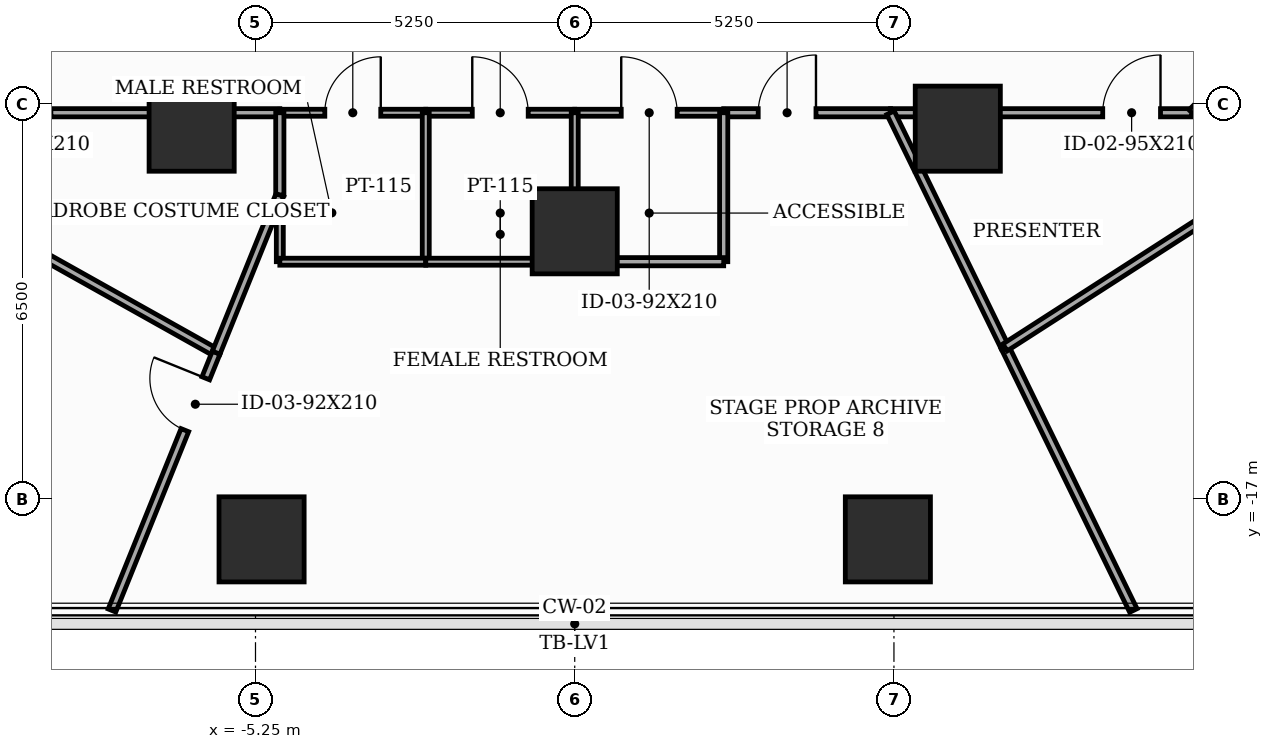
"""IFC4 building model, lengths in metres.
Left out: names, types, materials, properties, quantities, classifications, styles, units other than length and angle.
Written with IfcOpenShell. Run it as: python <this file> out.ifc"""

import sys

from ifc_helpers import new_model, si_unit, direction, frame, frame_2d, origin, origin_2d, place, context, subcontext, project, spatial, rectangle, extrude, element, fill, save


model = new_model("IFC4")
c1 = context("Model", 3, precision=1e-05, world=origin(), true_north=direction((0.0, 1.0)))
c2 = subcontext(c1, "Body", "Model", "MODEL_VIEW")
j1 = project(units=[si_unit("LENGTHUNIT", "METRE"), si_unit("PLANEANGLEUNIT", "RADIAN")], contexts=[c1])
p1 = place(None, origin())
s1 = spatial("IfcSite", under=j1, at=p1, CompositionType="ELEMENT")
p2 = place(p1, origin())
s2 = spatial("IfcBuilding", under=s1, at=p2, CompositionType="ELEMENT")
p3 = place(p2, frame((0.0, 0.0, 40.8)))
s3 = spatial("IfcBuildingStorey", under=s2, at=p3, CompositionType="ELEMENT", Elevation=40.8)
for number, where, z_axis, x_axis in (
    (1, (-6.3, -10.912, 0.0), (0.0, 0.0, 1.0), (1.0, 0.0, 0.0)),
    (2, (0.0, -12.6, 0.0), (0.0, 0.0, 1.0), (1.0, 0.0, 0.0)),
    (3, (6.3, -10.912, 0.0), (0.0, 0.0, 1.0), (1.0, 0.0, 0.0)),
    (4, (-5.15, -17.667, 0.0), (0.0, 0.0, 1.0), (1.0, 0.0, 0.0)),
    (5, (5.15, -17.667, 0.0), (0.0, 0.0, 1.0), (1.0, 0.0, 0.0)),
):
    element("IfcColumn", number, at=place(p3, frame(where, z_axis=z_axis, x_axis=x_axis)), inside=s3, PredefinedType="COLUMN", context=c2, shape_type="SweptSolid", body=[
        extrude(rectangle(XDim=1.4, YDim=1.4, at=origin_2d()), origin(), (0.0, 0.0, 1.0), 3.7),
    ])
p4 = place(p3, frame((-10.15, -10.65, 0.0), z_axis=(0.0, 0.0, 1.0), x_axis=(1.0, 0.0, 0.0)))
e6 = element("IfcWall", 6, at=p4, inside=s3, PredefinedType="PARTITIONING", context=c2, shape_type="SweptSolid", body=[
    extrude(rectangle(XDim=5.3, YDim=0.135, at=frame_2d((2.65, 0.0))), origin(), (0.0, 0.0, 1.0), 2.785),
])
p5 = place(p4, frame((0.585, 0.0, 0.0)))
e7 = element("IfcOpeningElement", 7, at=p5, cuts=e6, PredefinedType="OPENING", context=c2, shape_type="SweptSolid", body=[
    extrude(rectangle(XDim=0.95, YDim=2.1, at=frame_2d((0.475, 1.05))), frame((0.0, 0.077, 0.0), z_axis=(0.0, -1.0, 0.0), x_axis=(1.0, 0.0, 0.0)), (0.0, 0.0, 1.0), 0.155),
])
p6 = place(p3, frame((-4.85, -10.65, 0.0), z_axis=(0.0, 0.0, 1.0), x_axis=(1.0, 0.0, 0.0)))
e8 = element("IfcWall", 8, at=p6, inside=s3, PredefinedType="PARTITIONING", context=c2, shape_type="SweptSolid", body=[
    extrude(rectangle(XDim=2.4, YDim=0.115, at=frame_2d((1.2, 0.0))), origin(), (0.0, 0.0, 1.0), 3.5),
])
p7 = place(p6, frame((0.74, 0.0, 0.0)))
e9 = element("IfcOpeningElement", 9, at=p7, cuts=e8, PredefinedType="OPENING", context=c2, shape_type="SweptSolid", body=[
    extrude(rectangle(XDim=0.92, YDim=2.1, at=frame_2d((0.46, 1.05))), frame((0.0, 0.067, 0.0), z_axis=(0.0, -1.0, 0.0), x_axis=(1.0, 0.0, 0.0)), (0.0, 0.0, 1.0), 0.135),
])
p8 = place(p3, frame((-2.45, -10.65, 0.0), z_axis=(0.0, 0.0, 1.0), x_axis=(1.0, 0.0, 0.0)))
e10 = element("IfcWall", 10, at=p8, inside=s3, PredefinedType="PARTITIONING", context=c2, shape_type="SweptSolid", body=[
    extrude(rectangle(XDim=2.45, YDim=0.115, at=frame_2d((1.225, 0.0))), origin(), (0.0, 0.0, 1.0), 2.785),
])
p9 = place(p8, frame((0.765, 0.0, 0.0)))
e11 = element("IfcOpeningElement", 11, at=p9, cuts=e10, PredefinedType="OPENING", context=c2, shape_type="SweptSolid", body=[
    extrude(rectangle(XDim=0.92, YDim=2.1, at=frame_2d((0.46, 1.05))), frame((0.0, 0.067, 0.0), z_axis=(0.0, -1.0, 0.0), x_axis=(1.0, 0.0, 0.0)), (0.0, 0.0, 1.0), 0.135),
])
p10 = place(p3, frame((2.45, -10.65, 0.0), z_axis=(0.0, 0.0, 1.0), x_axis=(1.0, 0.0, 0.0)))
e12 = element("IfcWall", 12, at=p10, inside=s3, PredefinedType="PARTITIONING", context=c2, shape_type="SweptSolid", body=[
    extrude(rectangle(XDim=2.744, YDim=0.135, at=frame_2d((1.372, 0.0))), origin(), (0.0, 0.0, 1.0), 3.5),
])
p11 = place(p10, frame((0.568, 0.0, 0.0)))
e13 = element("IfcOpeningElement", 13, at=p11, cuts=e12, PredefinedType="OPENING", context=c2, shape_type="SweptSolid", body=[
    extrude(rectangle(XDim=0.95, YDim=2.1, at=frame_2d((0.475, 1.05))), frame((0.0, 0.077, 0.0), z_axis=(0.0, -1.0, 0.0), x_axis=(1.0, 0.0, 0.0)), (0.0, 0.0, 1.0), 0.155),
])
p12 = place(p3, frame((0.0, -10.65, 0.0), z_axis=(0.0, 0.0, 1.0), x_axis=(1.0, 0.0, 0.0)))
e14 = element("IfcWall", 14, at=p12, inside=s3, PredefinedType="PARTITIONING", context=c2, shape_type="SweptSolid", body=[
    extrude(rectangle(XDim=2.45, YDim=0.115, at=frame_2d((1.225, 0.0))), origin(), (0.0, 0.0, 1.0), 3.5),
])
p13 = place(p12, frame((0.765, 0.0, 0.0)))
e15 = element("IfcOpeningElement", 15, at=p13, cuts=e14, PredefinedType="OPENING", context=c2, shape_type="SweptSolid", body=[
    extrude(rectangle(XDim=0.92, YDim=2.1, at=frame_2d((0.46, 1.05))), frame((0.0, 0.067, 0.0), z_axis=(0.0, -1.0, 0.0), x_axis=(1.0, 0.0, 0.0)), (0.0, 0.0, 1.0), 0.135),
])
p14 = place(p3, frame((5.194, -10.65, 0.0), z_axis=(0.0, 0.0, 1.0), x_axis=(1.0, 0.0, 0.0)))
e16 = element("IfcWall", 16, at=p14, inside=s3, PredefinedType="PARTITIONING", context=c2, shape_type="SweptSolid", body=[
    extrude(rectangle(XDim=4.956, YDim=0.135, at=frame_2d((2.478, 0.0))), origin(), (0.0, 0.0, 1.0), 2.785),
])
p15 = place(p14, frame((3.49, 0.0, 0.0)))
e17 = element("IfcOpeningElement", 17, at=p15, cuts=e16, PredefinedType="OPENING", context=c2, shape_type="SweptSolid", body=[
    extrude(rectangle(XDim=0.95, YDim=2.1, at=frame_2d((0.475, 1.05))), frame((0.0, 0.077, 0.0), z_axis=(0.0, -1.0, 0.0), x_axis=(1.0, 0.0, 0.0)), (0.0, 0.0, 1.0), 0.155),
])
p16 = place(p3, frame((10.15, -10.65, 0.0), z_axis=(0.0, 0.0, 1.0), x_axis=(0.707106781187, 0.707106781187, 0.0)))
e18 = element("IfcWall", 18, at=p16, inside=s3, PredefinedType="PARTITIONING", context=c2, shape_type="SweptSolid", body=[
    extrude(rectangle(XDim=0.707, YDim=0.135, at=frame_2d((0.354, 0.0))), origin(), (0.0, 0.0, 1.0), 3.5),
])
p17 = place(p3, frame((-5.897, -14.596, 0.0), z_axis=(0.0, 0.0, 1.0), x_axis=(-0.87248894478, 0.488633851915, 0.0)))
e19 = element("IfcWall", 19, at=p17, inside=s3, PredefinedType="PARTITIONING", context=c2, shape_type="SweptSolid", body=[
    extrude(rectangle(XDim=4.39, YDim=0.135, at=frame_2d((2.195, 0.0))), origin(), (0.0, 0.0, 1.0), 2.685),
])
p18 = place(p3, frame((-7.61, -18.837, 0.0), z_axis=(0.0, 0.0, 1.0), x_axis=(0.374545124537, 0.927208687236, 0.0)))
e20 = element("IfcWall", 20, at=p18, inside=s3, PredefinedType="PARTITIONING", context=c2, shape_type="SweptSolid", body=[
    extrude(rectangle(XDim=4.574, YDim=0.135, at=frame_2d((2.287, 0.0))), origin(), (0.0, 0.0, 1.0), 2.685),
])
p19 = place(p18, frame((3.199, 0.0, 0.0)))
e21 = element("IfcOpeningElement", 21, at=p19, cuts=e20, PredefinedType="OPENING", context=c2, shape_type="SweptSolid", body=[
    extrude(rectangle(XDim=0.92, YDim=2.1, at=frame_2d((0.46, 1.05))), frame((0.0, 0.077, 0.0), z_axis=(0.0, -1.0, 0.0), x_axis=(1.0, 0.0, 0.0)), (0.0, 0.0, 1.0), 0.155),
])
p20 = place(p3, frame((-4.85, -12.004, 0.0), z_axis=(0.0, 0.0, 1.0), x_axis=(0.0, 1.0, 0.0)))
e22 = element("IfcWall", 22, at=p20, inside=s3, PredefinedType="PARTITIONING", context=c2, shape_type="SweptSolid", body=[
    extrude(rectangle(XDim=1.354, YDim=0.135, at=frame_2d((0.677, 0.0))), origin(), (0.0, 0.0, 1.0), 2.785),
])
p21 = place(p3, frame((-5.897, -14.596, 0.0), z_axis=(0.0, 0.0, 1.0), x_axis=(0.374490485533, 0.92723075674, 0.0)))
e23 = element("IfcWall", 23, at=p21, inside=s3, PredefinedType="PARTITIONING", context=c2, shape_type="SweptSolid", body=[
    extrude(rectangle(XDim=2.795, YDim=0.135, at=frame_2d((1.398, 0.0))), origin(), (0.0, 0.0, 1.0), 2.685),
])
p22 = place(p3, frame((-2.45, -13.1, 0.0), z_axis=(0.0, 0.0, 1.0), x_axis=(0.0, 1.0, 0.0)))
e24 = element("IfcWall", 24, at=p22, inside=s3, PredefinedType="PARTITIONING", context=c2, shape_type="SweptSolid", body=[
    extrude(rectangle(XDim=2.45, YDim=0.115, at=frame_2d((1.225, 0.0))), origin(), (0.0, 0.0, 1.0), 2.785),
])
p23 = place(p3, frame((-4.85, -12.298, 0.0), z_axis=(0.0, 0.0, 1.0), x_axis=(0.0, -1.0, 0.0)))
e25 = element("IfcWall", 25, at=p23, inside=s3, PredefinedType="PARTITIONING", context=c2, shape_type="SweptSolid", body=[
    extrude(rectangle(XDim=0.802, YDim=0.115, at=frame_2d((0.401, 0.0))), origin(), (0.0, 0.0, 1.0), 3.5),
])
p24 = place(p3, frame((-4.85, -13.1, 0.0), z_axis=(0.0, 0.0, 1.0), x_axis=(1.0, 0.0, 0.0)))
e26 = element("IfcWall", 26, at=p24, inside=s3, PredefinedType="PARTITIONING", context=c2, shape_type="SweptSolid", body=[
    extrude(rectangle(XDim=2.4, YDim=0.115, at=frame_2d((1.2, 0.0))), origin(), (0.0, 0.0, 1.0), 3.5),
])
p25 = place(p3, frame((-2.45, -13.1, 0.0), z_axis=(0.0, 0.0, 1.0), x_axis=(1.0, 0.0, 0.0)))
e27 = element("IfcWall", 27, at=p25, inside=s3, PredefinedType="PARTITIONING", context=c2, shape_type="SweptSolid", body=[
    extrude(rectangle(XDim=2.45, YDim=0.115, at=frame_2d((1.225, 0.0))), origin(), (0.0, 0.0, 1.0), 2.085),
])
p26 = place(p3, frame((0.0, -13.1, 0.0), z_axis=(0.0, 0.0, 1.0), x_axis=(0.0, 1.0, 0.0)))
e28 = element("IfcWall", 28, at=p26, inside=s3, PredefinedType="PARTITIONING", context=c2, shape_type="SweptSolid", body=[
    extrude(rectangle(XDim=2.45, YDim=0.115, at=frame_2d((1.225, 0.0))), origin(), (0.0, 0.0, 1.0), 2.085),
])
p27 = place(p3, frame((2.45, -10.65, 0.0), z_axis=(0.0, 0.0, 1.0), x_axis=(0.0, -1.0, 0.0)))
e29 = element("IfcWall", 29, at=p27, inside=s3, PredefinedType="PARTITIONING", context=c2, shape_type="SweptSolid", body=[
    extrude(rectangle(XDim=2.45, YDim=0.135, at=frame_2d((1.225, 0.0))), origin(), (0.0, 0.0, 1.0), 2.785),
])
p28 = place(p3, frame((2.45, -13.1, 0.0), z_axis=(0.0, 0.0, 1.0), x_axis=(-1.0, 0.0, 0.0)))
e30 = element("IfcWall", 30, at=p28, inside=s3, PredefinedType="PARTITIONING", context=c2, shape_type="SweptSolid", body=[
    extrude(rectangle(XDim=2.45, YDim=0.135, at=frame_2d((1.225, 0.0))), origin(), (0.0, 0.0, 1.0), 2.085),
])
p29 = place(p3, frame((7.077, -14.51, 0.0), z_axis=(0.0, 0.0, 1.0), x_axis=(-0.438392272504, 0.898783742292, 0.0)))
e31 = element("IfcWall", 31, at=p29, inside=s3, PredefinedType="PARTITIONING", context=c2, shape_type="SweptSolid", body=[
    extrude(rectangle(XDim=4.295, YDim=0.135, at=frame_2d((2.147, 0.0))), origin(), (0.0, 0.0, 1.0), 2.675),
])
p30 = place(p3, frame((9.188, -18.837, 0.0), z_axis=(0.0, 0.0, 1.0), x_axis=(-0.438408644876, 0.898775756292, 0.0)))
e32 = element("IfcWall", 32, at=p30, inside=s3, PredefinedType="PARTITIONING", context=c2, shape_type="SweptSolid", body=[
    extrude(rectangle(XDim=4.814, YDim=0.135, at=frame_2d((2.407, 0.0))), origin(), (0.0, 0.0, 1.0), 2.925),
])
p31 = place(p3, frame((7.077, -14.51, 0.0), z_axis=(0.0, 0.0, 1.0), x_axis=(0.841056333741, 0.540947542258, 0.0)))
e33 = element("IfcWall", 33, at=p31, inside=s3, PredefinedType="PARTITIONING", context=c2, shape_type="SweptSolid", body=[
    extrude(rectangle(XDim=4.222, YDim=0.135, at=frame_2d((2.111, 0.0))), origin(), (0.0, 0.0, 1.0), 2.685),
])
p32 = place(p7, origin())
e34 = element("IfcDoor", 34, at=p32, inside=s3, OperationType="SINGLE_SWING_RIGHT", PredefinedType="DOOR", context=c2, shape_type="SweptSolid", body=[
    extrude(rectangle(XDim=0.92, YDim=2.1, at=frame_2d((0.46, 1.05))), frame((0.0, 0.025, 0.0), z_axis=(0.0, -1.0, 0.0), x_axis=(1.0, 0.0, 0.0)), (0.0, 0.0, 1.0), 0.05),
])
fill(e9, e34)
p33 = place(p9, origin())
e35 = element("IfcDoor", 35, at=p33, inside=s3, OperationType="SINGLE_SWING_LEFT", PredefinedType="DOOR", context=c2, shape_type="SweptSolid", body=[
    extrude(rectangle(XDim=0.92, YDim=2.1, at=frame_2d((0.46, 1.05))), frame((0.0, 0.025, 0.0), z_axis=(0.0, -1.0, 0.0), x_axis=(1.0, 0.0, 0.0)), (0.0, 0.0, 1.0), 0.05),
])
fill(e11, e35)
p34 = place(p11, origin())
e36 = element("IfcDoor", 36, at=p34, inside=s3, OperationType="SINGLE_SWING_RIGHT", PredefinedType="DOOR", context=c2, shape_type="SweptSolid", body=[
    extrude(rectangle(XDim=0.95, YDim=2.1, at=frame_2d((0.475, 1.05))), frame((0.0, 0.025, 0.0), z_axis=(0.0, -1.0, 0.0), x_axis=(1.0, 0.0, 0.0)), (0.0, 0.0, 1.0), 0.05),
])
fill(e13, e36)
p35 = place(p13, origin())
e37 = element("IfcDoor", 37, at=p35, inside=s3, OperationType="SINGLE_SWING_LEFT", PredefinedType="DOOR", context=c2, shape_type="SweptSolid", body=[
    extrude(rectangle(XDim=0.92, YDim=2.1, at=frame_2d((0.46, 1.05))), frame((0.0, 0.025, 0.0), z_axis=(0.0, -1.0, 0.0), x_axis=(1.0, 0.0, 0.0)), (0.0, 0.0, 1.0), 0.05),
])
fill(e15, e37)
p36 = place(p15, origin())
e38 = element("IfcDoor", 38, at=p36, inside=s3, OperationType="SINGLE_SWING_RIGHT", PredefinedType="DOOR", context=c2, shape_type="SweptSolid", body=[
    extrude(rectangle(XDim=0.95, YDim=2.1, at=frame_2d((0.475, 1.05))), frame((0.0, 0.025, 0.0), z_axis=(0.0, -1.0, 0.0), x_axis=(1.0, 0.0, 0.0)), (0.0, 0.0, 1.0), 0.05),
])
fill(e17, e38)
p37 = place(p19, origin())
e39 = element("IfcDoor", 39, at=p37, inside=s3, OperationType="SINGLE_SWING_RIGHT", PredefinedType="DOOR", context=c2, shape_type="SweptSolid", body=[
    extrude(rectangle(XDim=0.92, YDim=2.1, at=frame_2d((0.46, 1.05))), frame((0.0, 0.025, 0.0), z_axis=(0.0, -1.0, 0.0), x_axis=(1.0, 0.0, 0.0)), (0.0, 0.0, 1.0), 0.05),
])
fill(e21, e39)
save(model, sys.argv[1])
